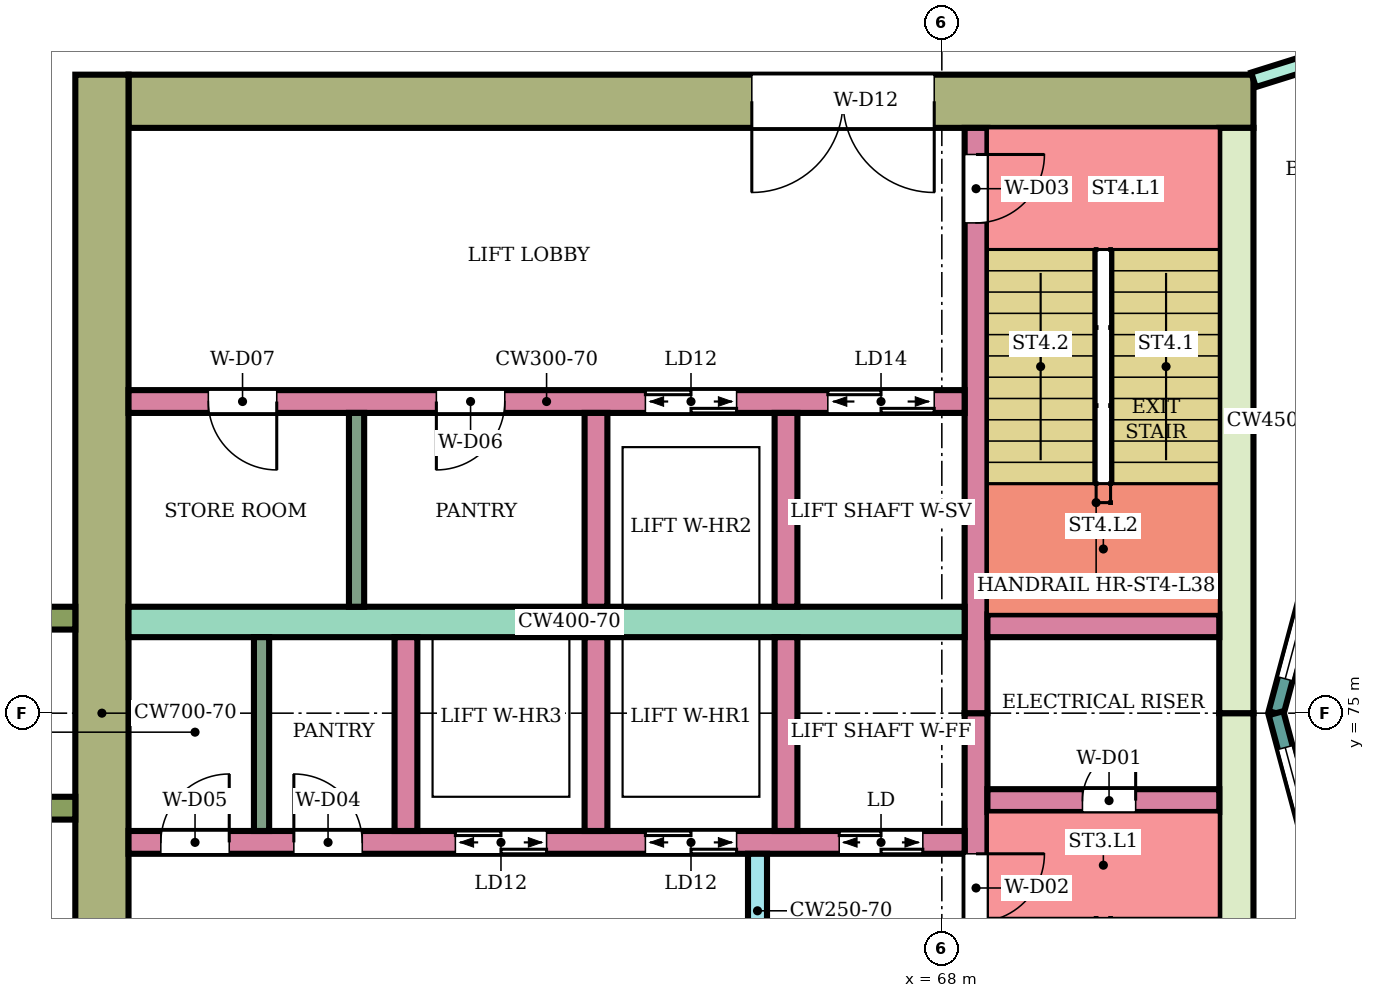
"""IFC4 building model, lengths in metres.
Left out: names, types, materials, properties, quantities, classifications, styles, units other than length and angle.
Written with IfcOpenShell. Run it as: python <this file> out.ifc"""

import sys

from ifc_helpers import new_model, si_unit, direction, frame, frame_2d, origin, place, context, subcontext, project, spatial, rectangle, extrude, element, fill, save


model = new_model("IFC4")
c1 = context("Model", 3, precision=1e-05, world=origin(), true_north=direction((0.0, 1.0)))
c2 = subcontext(c1, "Body", "Model", "MODEL_VIEW")
j1 = project(units=[si_unit("LENGTHUNIT", "METRE"), si_unit("PLANEANGLEUNIT", "RADIAN")], contexts=[c1])
p1 = place(None, origin())
s1 = spatial("IfcSite", under=j1, at=p1, CompositionType="ELEMENT")
p2 = place(p1, origin())
s2 = spatial("IfcBuilding", under=s1, at=p2, CompositionType="ELEMENT")
p3 = place(p2, frame((0.0, 0.0, 165.9)))
s3 = spatial("IfcBuildingStorey", under=s2, at=p3, CompositionType="ELEMENT", Elevation=165.9)
p4 = place(p3, frame((72.1, 83.05, 0.0), z_axis=(0.0, 0.0, 1.0), x_axis=(-1.0, 0.0, 0.0)))
e1 = element("IfcWall", 1, at=p4, inside=s3, PredefinedType="SHEAR", context=c2, shape_type="SweptSolid", body=[
    extrude(rectangle(XDim=14.8, YDim=0.7, at=frame_2d((7.4, 0.0))), origin(), (0.0, 0.0, 1.0), 3.78),
])
p5 = place(p4, frame((4.2, 0.0, 0.0)))
e2 = element("IfcOpeningElement", 2, at=p5, cuts=e1, PredefinedType="OPENING", context=c2, shape_type="SweptSolid", body=[
    extrude(rectangle(XDim=2.4, YDim=2.4, at=frame_2d((1.2, 1.2))), frame((0.0, 0.36, 0.0), z_axis=(0.0, -1.0, 0.0), x_axis=(1.0, 0.0, 0.0)), (0.0, 0.0, 1.0), 0.72),
])
for number, where, z_axis, x_axis in (
    (3, (71.875, 75.0, 0.0), (0.0, 0.0, 1.0), (0.0, -1.0, 0.0)),
    (4, (71.875, 82.7, 0.0), (0.0, 0.0, 1.0), (0.0, -1.0, 0.0)),
):
    element("IfcWall", number, at=place(p3, frame(where, z_axis=z_axis, x_axis=x_axis)), inside=s3, PredefinedType="SHEAR", context=c2, shape_type="SweptSolid", body=[
        extrude(rectangle(XDim=7.7, YDim=0.45, at=frame_2d((3.85, 0.0))), origin(), (0.0, 0.0, 1.0), 3.78),
    ])
p6 = place(p3, frame((56.95, 83.4, 0.0), z_axis=(0.0, 0.0, 1.0), x_axis=(0.0, -1.0, 0.0)))
e5 = element("IfcWall", 5, at=p6, inside=s3, PredefinedType="SHEAR", context=c2, shape_type="SweptSolid", body=[
    extrude(rectangle(XDim=16.8, YDim=0.7, at=frame_2d((8.4, 0.0))), origin(), (0.0, 0.0, 1.0), 3.78),
])
p7 = place(p3, frame((68.45, 75.0, 0.0), z_axis=(0.0, 0.0, 1.0), x_axis=(0.0, -1.0, 0.0)))
e6 = element("IfcWall", 6, at=p7, inside=s3, PredefinedType="SHEAR", context=c2, shape_type="SweptSolid", body=[
    extrude(rectangle(XDim=7.7, YDim=0.3, at=frame_2d((3.85, 0.0))), origin(), (0.0, 0.0, 1.0), 3.78),
])
p8 = place(p7, frame((1.85, 0.0, 0.0)))
e7 = element("IfcOpeningElement", 7, at=p8, cuts=e6, PredefinedType="OPENING", context=c2, shape_type="SweptSolid", body=[
    extrude(rectangle(XDim=0.9, YDim=2.1, at=frame_2d((0.45, 1.05))), frame((0.0, 0.16, 0.0), z_axis=(0.0, -1.0, 0.0), x_axis=(1.0, 0.0, 0.0)), (0.0, 0.0, 1.0), 0.32),
])
p9 = place(p3, frame((68.45, 82.7, 0.0), z_axis=(0.0, 0.0, 1.0), x_axis=(0.0, -1.0, 0.0)))
e8 = element("IfcWall", 8, at=p9, inside=s3, PredefinedType="SHEAR", context=c2, shape_type="SweptSolid", body=[
    extrude(rectangle(XDim=7.7, YDim=0.3, at=frame_2d((3.85, 0.0))), origin(), (0.0, 0.0, 1.0), 3.78),
])
p10 = place(p9, frame((0.35, 0.0, 0.0)))
e9 = element("IfcOpeningElement", 9, at=p10, cuts=e8, PredefinedType="OPENING", context=c2, shape_type="SweptSolid", body=[
    extrude(rectangle(XDim=0.9, YDim=2.1, at=frame_2d((0.45, 1.05))), frame((0.0, 0.16, 0.0), z_axis=(0.0, -1.0, 0.0), x_axis=(1.0, 0.0, 0.0)), (0.0, 0.0, 1.0), 0.32),
])
p11 = place(p3, frame((71.65, 73.85, 0.0), z_axis=(0.0, 0.0, 1.0), x_axis=(-1.0, 0.0, 0.0)))
e10 = element("IfcWall", 10, at=p11, inside=s3, PredefinedType="SHEAR", context=c2, shape_type="SweptSolid", body=[
    extrude(rectangle(XDim=3.05, YDim=0.3, at=frame_2d((1.525, 0.0))), origin(), (0.0, 0.0, 1.0), 3.78),
])
p12 = place(p11, frame((1.1, 0.0, 0.0)))
e11 = element("IfcOpeningElement", 11, at=p12, cuts=e10, PredefinedType="OPENING", context=c2, shape_type="SweptSolid", body=[
    extrude(rectangle(XDim=0.7, YDim=2.0, at=frame_2d((0.35, 1.0))), frame((0.0, 0.16, 0.0), z_axis=(0.0, -1.0, 0.0), x_axis=(1.0, 0.0, 0.0)), (0.0, 0.0, 1.0), 0.32),
])
p13 = place(p3, frame((71.65, 76.15, 0.0), z_axis=(0.0, 0.0, 1.0), x_axis=(-1.0, 0.0, 0.0)))
e12 = element("IfcWall", 12, at=p13, inside=s3, PredefinedType="SHEAR", context=c2, shape_type="SweptSolid", body=[
    extrude(rectangle(XDim=3.05, YDim=0.3, at=frame_2d((1.525, 0.0))), origin(), (0.0, 0.0, 1.0), 3.78),
])
p14 = place(p3, frame((68.3, 73.3, 0.0), z_axis=(0.0, 0.0, 1.0), x_axis=(-1.0, 0.0, 0.0)))
e13 = element("IfcWall", 13, at=p14, inside=s3, PredefinedType="SHEAR", context=c2, shape_type="SweptSolid", body=[
    extrude(rectangle(XDim=11.0, YDim=0.3, at=frame_2d((5.5, 0.0))), origin(), (0.0, 0.0, 1.0), 3.78),
])
p15 = place(p14, frame((0.55, 0.0, 0.0)))
e14 = element("IfcOpeningElement", 14, at=p15, cuts=e13, PredefinedType="OPENING", context=c2, shape_type="SweptSolid", body=[
    extrude(rectangle(XDim=1.1, YDim=2.1, at=frame_2d((0.55, 1.05))), frame((0.0, 0.16, 0.0), z_axis=(0.0, -1.0, 0.0), x_axis=(1.0, 0.0, 0.0)), (0.0, 0.0, 1.0), 0.32),
])
p16 = place(p14, frame((3.0, 0.0, 0.0)))
e15 = element("IfcOpeningElement", 15, at=p16, cuts=e13, PredefinedType="OPENING", context=c2, shape_type="SweptSolid", body=[
    extrude(rectangle(XDim=1.2, YDim=2.1, at=frame_2d((0.6, 1.05))), frame((0.0, 0.16, 0.0), z_axis=(0.0, -1.0, 0.0), x_axis=(1.0, 0.0, 0.0)), (0.0, 0.0, 1.0), 0.32),
])
p17 = place(p14, frame((5.5, 0.0, 0.0)))
e16 = element("IfcOpeningElement", 16, at=p17, cuts=e13, PredefinedType="OPENING", context=c2, shape_type="SweptSolid", body=[
    extrude(rectangle(XDim=1.2, YDim=2.1, at=frame_2d((0.6, 1.05))), frame((0.0, 0.16, 0.0), z_axis=(0.0, -1.0, 0.0), x_axis=(1.0, 0.0, 0.0)), (0.0, 0.0, 1.0), 0.32),
])
p18 = place(p14, frame((7.925, 0.0, 0.0)))
e17 = element("IfcOpeningElement", 17, at=p18, cuts=e13, PredefinedType="OPENING", context=c2, shape_type="SweptSolid", body=[
    extrude(rectangle(XDim=0.9, YDim=2.1, at=frame_2d((0.45, 1.05))), frame((0.0, 0.16, 0.0), z_axis=(0.0, -1.0, 0.0), x_axis=(1.0, 0.0, 0.0)), (0.0, 0.0, 1.0), 0.32),
])
p19 = place(p14, frame((9.675, 0.0, 0.0)))
e18 = element("IfcOpeningElement", 18, at=p19, cuts=e13, PredefinedType="OPENING", context=c2, shape_type="SweptSolid", body=[
    extrude(rectangle(XDim=0.9, YDim=2.1, at=frame_2d((0.45, 1.05))), frame((0.0, 0.16, 0.0), z_axis=(0.0, -1.0, 0.0), x_axis=(1.0, 0.0, 0.0)), (0.0, 0.0, 1.0), 0.32),
])
p20 = place(p3, frame((68.3, 76.2, 0.0), z_axis=(0.0, 0.0, 1.0), x_axis=(-1.0, 0.0, 0.0)))
e19 = element("IfcWall", 19, at=p20, inside=s3, PredefinedType="SHEAR", context=c2, shape_type="SweptSolid", body=[
    extrude(rectangle(XDim=11.0, YDim=0.4, at=frame_2d((5.5, 0.0))), origin(), (0.0, 0.0, 1.0), 3.78),
])
p21 = place(p3, frame((68.3, 79.1, 0.0), z_axis=(0.0, 0.0, 1.0), x_axis=(-1.0, 0.0, 0.0)))
e20 = element("IfcWall", 20, at=p21, inside=s3, PredefinedType="SHEAR", context=c2, shape_type="SweptSolid", body=[
    extrude(rectangle(XDim=11.0, YDim=0.3, at=frame_2d((5.5, 0.0))), origin(), (0.0, 0.0, 1.0), 3.78),
])
p22 = place(p21, frame((0.4, 0.0, 0.0)))
e21 = element("IfcOpeningElement", 21, at=p22, cuts=e20, PredefinedType="OPENING", context=c2, shape_type="SweptSolid", body=[
    extrude(rectangle(XDim=1.4, YDim=2.1, at=frame_2d((0.7, 1.05))), frame((0.0, 0.16, 0.0), z_axis=(0.0, -1.0, 0.0), x_axis=(1.0, 0.0, 0.0)), (0.0, 0.0, 1.0), 0.32),
])
p23 = place(p21, frame((3.0, 0.0, 0.0)))
e22 = element("IfcOpeningElement", 22, at=p23, cuts=e20, PredefinedType="OPENING", context=c2, shape_type="SweptSolid", body=[
    extrude(rectangle(XDim=1.2, YDim=2.1, at=frame_2d((0.6, 1.05))), frame((0.0, 0.16, 0.0), z_axis=(0.0, -1.0, 0.0), x_axis=(1.0, 0.0, 0.0)), (0.0, 0.0, 1.0), 0.32),
])
p24 = place(p21, frame((6.05, 0.0, 0.0)))
e23 = element("IfcOpeningElement", 23, at=p24, cuts=e20, PredefinedType="OPENING", context=c2, shape_type="SweptSolid", body=[
    extrude(rectangle(XDim=0.9, YDim=2.1, at=frame_2d((0.45, 1.05))), frame((0.0, 0.16, 0.0), z_axis=(0.0, -1.0, 0.0), x_axis=(1.0, 0.0, 0.0)), (0.0, 0.0, 1.0), 0.32),
])
p25 = place(p21, frame((9.05, 0.0, 0.0)))
e24 = element("IfcOpeningElement", 24, at=p25, cuts=e20, PredefinedType="OPENING", context=c2, shape_type="SweptSolid", body=[
    extrude(rectangle(XDim=0.9, YDim=2.1, at=frame_2d((0.45, 1.05))), frame((0.0, 0.16, 0.0), z_axis=(0.0, -1.0, 0.0), x_axis=(1.0, 0.0, 0.0)), (0.0, 0.0, 1.0), 0.32),
])
for number, where, z_axis, x_axis in (
    (25, (65.95, 76.0, 0.0), (0.0, 0.0, 1.0), (0.0, -1.0, 0.0)),
    (26, (63.45, 76.0, 0.0), (0.0, 0.0, 1.0), (0.0, -1.0, 0.0)),
    (27, (60.95, 76.0, 0.0), (0.0, 0.0, 1.0), (0.0, -1.0, 0.0)),
    (28, (65.95, 78.95, 0.0), (0.0, 0.0, 1.0), (0.0, -1.0, 0.0)),
    (29, (63.45, 78.95, 0.0), (0.0, 0.0, 1.0), (0.0, -1.0, 0.0)),
):
    element("IfcWall", number, at=place(p3, frame(where, z_axis=z_axis, x_axis=x_axis)), inside=s3, PredefinedType="SHEAR", context=c2, shape_type="SweptSolid", body=[
        extrude(rectangle(XDim=2.55, YDim=0.3, at=frame_2d((1.275, 0.0))), origin(), (0.0, 0.0, 1.0), 3.78),
    ])
p26 = place(p3, frame((65.575, 73.15, 0.0), z_axis=(0.0, 0.0, 1.0), x_axis=(0.0, -1.0, 0.0)))
e30 = element("IfcWall", 30, at=p26, inside=s3, PredefinedType="SHEAR", context=c2, shape_type="SweptSolid", body=[
    extrude(rectangle(XDim=1.5, YDim=0.25, at=frame_2d((0.75, 0.0))), origin(), (0.0, 0.0, 1.0), 3.78),
])
for number, where, z_axis, x_axis in (
    (31, (56.6, 76.25, 0.0), (0.0, 0.0, 1.0), (-1.0, 0.0, 0.0)),
    (32, (56.6, 73.75, 0.0), (0.0, 0.0, 1.0), (-1.0, 0.0, 0.0)),
):
    element("IfcWall", number, at=place(p3, frame(where, z_axis=z_axis, x_axis=x_axis)), inside=s3, PredefinedType="NOTDEFINED", context=c2, shape_type="SweptSolid", body=[
        extrude(rectangle(XDim=2.416, YDim=0.3, at=frame_2d((1.208, 0.0))), origin(), (0.0, 0.0, 1.0), 4.1),
    ])
p27 = place(p3, frame((73.415, 78.802, 0.0), z_axis=(0.0, 0.0, 1.0), x_axis=(-0.258789828301, -0.965933654434, 0.0)))
e33 = element("IfcWall", 33, at=p27, inside=s3, PredefinedType="NOTDEFINED", context=c2, shape_type="SweptSolid", body=[
    extrude(rectangle(XDim=3.936, YDim=0.2, at=frame_2d((1.968, 0.0))), origin(), (0.0, 0.0, 1.0), 4.1),
])
p28 = place(p27, frame((0.468, 0.0, 0.9)))
e34 = element("IfcOpeningElement", 34, at=p28, cuts=e33, PredefinedType="OPENING", context=c2, shape_type="SweptSolid", body=[
    extrude(rectangle(XDim=3.0, YDim=2.3, at=frame_2d((1.5, 1.15))), frame((0.0, 0.11, 0.0), z_axis=(0.0, -1.0, 0.0), x_axis=(1.0, 0.0, 0.0)), (0.0, 0.0, 1.0), 0.22),
])
p29 = place(p3, frame((72.396, 75.0, 0.0), z_axis=(0.0, 0.0, 1.0), x_axis=(0.258789828301, -0.965933654434, 0.0)))
e35 = element("IfcWall", 35, at=p29, inside=s3, PredefinedType="NOTDEFINED", context=c2, shape_type="SweptSolid", body=[
    extrude(rectangle(XDim=3.936, YDim=0.2, at=frame_2d((1.968, 0.0))), origin(), (0.0, 0.0, 1.0), 4.1),
])
p30 = place(p29, frame((0.468, 0.0, 0.9)))
e36 = element("IfcOpeningElement", 36, at=p30, cuts=e35, PredefinedType="OPENING", context=c2, shape_type="SweptSolid", body=[
    extrude(rectangle(XDim=3.0, YDim=2.3, at=frame_2d((1.5, 1.15))), frame((0.0, 0.11, 0.0), z_axis=(0.0, -1.0, 0.0), x_axis=(1.0, 0.0, 0.0)), (0.0, 0.0, 1.0), 0.22),
])
p31 = place(p3, frame((72.1, 83.332, 0.0), z_axis=(0.0, 0.0, 1.0), x_axis=(0.954233106619, 0.299063836383, 0.0)))
e37 = element("IfcWall", 37, at=p31, inside=s3, PredefinedType="PARTITIONING", context=c2, shape_type="SweptSolid", body=[
    extrude(rectangle(XDim=2.414, YDim=0.2, at=frame_2d((1.207, 0.0))), origin(), (0.0, 0.0, 1.0), 3.65),
])
p32 = place(p31, frame((0.762, 0.0, 0.0)))
e38 = element("IfcOpeningElement", 38, at=p32, cuts=e37, PredefinedType="OPENING", context=c2, shape_type="SweptSolid", body=[
    extrude(rectangle(XDim=0.9, YDim=2.1, at=frame_2d((0.45, 1.05))), frame((0.0, 0.11, 0.0), z_axis=(0.0, -1.0, 0.0), x_axis=(1.0, 0.0, 0.0)), (0.0, 0.0, 1.0), 0.22),
])
for number, where, z_axis, x_axis in (
    (39, (59.05, 76.0, 0.0), (0.0, 0.0, 1.0), (0.0, -1.0, 0.0)),
    (40, (60.3, 78.95, 0.0), (0.0, 0.0, 1.0), (0.0, -1.0, 0.0)),
):
    element("IfcWall", number, at=place(p3, frame(where, z_axis=z_axis, x_axis=x_axis)), inside=s3, PredefinedType="PARTITIONING", context=c2, shape_type="SweptSolid", body=[
        extrude(rectangle(XDim=2.55, YDim=0.2, at=frame_2d((1.275, 0.0))), origin(), (0.0, 0.0, 1.0), 3.78),
    ])
p33 = place(p28, origin())
e41 = element("IfcWindow", 41, at=p33, inside=s3, PartitioningType="SINGLE_PANEL", PredefinedType="WINDOW", context=c2, shape_type="SweptSolid", body=[
    extrude(rectangle(XDim=3.0, YDim=2.3, at=frame_2d((1.5, 1.15))), frame((0.0, 0.03, 0.0), z_axis=(0.0, -1.0, 0.0), x_axis=(1.0, 0.0, 0.0)), (0.0, 0.0, 1.0), 0.06),
])
fill(e34, e41)
p34 = place(p30, origin())
e42 = element("IfcWindow", 42, at=p34, inside=s3, PartitioningType="SINGLE_PANEL", PredefinedType="WINDOW", context=c2, shape_type="SweptSolid", body=[
    extrude(rectangle(XDim=3.0, YDim=2.3, at=frame_2d((1.5, 1.15))), frame((0.0, 0.03, 0.0), z_axis=(0.0, -1.0, 0.0), x_axis=(1.0, 0.0, 0.0)), (0.0, 0.0, 1.0), 0.06),
])
fill(e36, e42)
p35 = place(p12, frame((0.7, 0.0, 0.0), z_axis=(0.0, 0.0, 1.0), x_axis=(-1.0, 0.0, 0.0)))
e43 = element("IfcDoor", 43, at=p35, inside=s3, OperationType="SINGLE_SWING_RIGHT", PredefinedType="DOOR", context=c2, shape_type="SweptSolid", body=[
    extrude(rectangle(XDim=0.7, YDim=2.0, at=frame_2d((0.35, 1.0))), frame((0.0, 0.025, 0.0), z_axis=(0.0, -1.0, 0.0), x_axis=(1.0, 0.0, 0.0)), (0.0, 0.0, 1.0), 0.05),
])
fill(e11, e43)
p36 = place(p8, origin())
e44 = element("IfcDoor", 44, at=p36, inside=s3, OperationType="SINGLE_SWING_LEFT", PredefinedType="DOOR", context=c2, shape_type="SweptSolid", body=[
    extrude(rectangle(XDim=0.9, YDim=2.1, at=frame_2d((0.45, 1.05))), frame((0.0, 0.025, 0.0), z_axis=(0.0, -1.0, 0.0), x_axis=(1.0, 0.0, 0.0)), (0.0, 0.0, 1.0), 0.05),
])
fill(e7, e44)
p37 = place(p10, origin())
e45 = element("IfcDoor", 45, at=p37, inside=s3, OperationType="SINGLE_SWING_LEFT", PredefinedType="DOOR", context=c2, shape_type="SweptSolid", body=[
    extrude(rectangle(XDim=0.9, YDim=2.1, at=frame_2d((0.45, 1.05))), frame((0.0, 0.025, 0.0), z_axis=(0.0, -1.0, 0.0), x_axis=(1.0, 0.0, 0.0)), (0.0, 0.0, 1.0), 0.05),
])
fill(e9, e45)
p38 = place(p15, origin())
e46 = element("IfcDoor", 46, at=p38, inside=s3, OperationType="DOUBLE_DOOR_SLIDING", PredefinedType="DOOR", context=c2, shape_type="SweptSolid", body=[
    extrude(rectangle(XDim=1.1, YDim=2.1, at=frame_2d((0.55, 1.05))), frame((0.0, 0.025, 0.0), z_axis=(0.0, -1.0, 0.0), x_axis=(1.0, 0.0, 0.0)), (0.0, 0.0, 1.0), 0.05),
])
fill(e14, e46)
p39 = place(p16, origin())
e47 = element("IfcDoor", 47, at=p39, inside=s3, OperationType="DOUBLE_DOOR_SLIDING", PredefinedType="DOOR", context=c2, shape_type="SweptSolid", body=[
    extrude(rectangle(XDim=1.2, YDim=2.1, at=frame_2d((0.6, 1.05))), frame((0.0, 0.025, 0.0), z_axis=(0.0, -1.0, 0.0), x_axis=(1.0, 0.0, 0.0)), (0.0, 0.0, 1.0), 0.05),
])
fill(e15, e47)
p40 = place(p17, origin())
e48 = element("IfcDoor", 48, at=p40, inside=s3, OperationType="DOUBLE_DOOR_SLIDING", PredefinedType="DOOR", context=c2, shape_type="SweptSolid", body=[
    extrude(rectangle(XDim=1.2, YDim=2.1, at=frame_2d((0.6, 1.05))), frame((0.0, 0.025, 0.0), z_axis=(0.0, -1.0, 0.0), x_axis=(1.0, 0.0, 0.0)), (0.0, 0.0, 1.0), 0.05),
])
fill(e16, e48)
p41 = place(p18, frame((0.9, 0.0, 0.0), z_axis=(0.0, 0.0, 1.0), x_axis=(-1.0, 0.0, 0.0)))
e49 = element("IfcDoor", 49, at=p41, inside=s3, OperationType="SINGLE_SWING_LEFT", PredefinedType="DOOR", context=c2, shape_type="SweptSolid", body=[
    extrude(rectangle(XDim=0.9, YDim=2.1, at=frame_2d((0.45, 1.05))), frame((0.0, 0.025, 0.0), z_axis=(0.0, -1.0, 0.0), x_axis=(1.0, 0.0, 0.0)), (0.0, 0.0, 1.0), 0.05),
])
fill(e17, e49)
p42 = place(p19, frame((0.9, 0.0, 0.0), z_axis=(0.0, 0.0, 1.0), x_axis=(-1.0, 0.0, 0.0)))
e50 = element("IfcDoor", 50, at=p42, inside=s3, OperationType="SINGLE_SWING_RIGHT", PredefinedType="DOOR", context=c2, shape_type="SweptSolid", body=[
    extrude(rectangle(XDim=0.9, YDim=2.1, at=frame_2d((0.45, 1.05))), frame((0.0, 0.025, 0.0), z_axis=(0.0, -1.0, 0.0), x_axis=(1.0, 0.0, 0.0)), (0.0, 0.0, 1.0), 0.05),
])
fill(e18, e50)
p43 = place(p22, origin())
e51 = element("IfcDoor", 51, at=p43, inside=s3, OperationType="DOUBLE_DOOR_SLIDING", PredefinedType="DOOR", context=c2, shape_type="SweptSolid", body=[
    extrude(rectangle(XDim=1.4, YDim=2.1, at=frame_2d((0.7, 1.05))), frame((0.0, 0.025, 0.0), z_axis=(0.0, -1.0, 0.0), x_axis=(1.0, 0.0, 0.0)), (0.0, 0.0, 1.0), 0.05),
])
fill(e21, e51)
p44 = place(p23, origin())
e52 = element("IfcDoor", 52, at=p44, inside=s3, OperationType="DOUBLE_DOOR_SLIDING", PredefinedType="DOOR", context=c2, shape_type="SweptSolid", body=[
    extrude(rectangle(XDim=1.2, YDim=2.1, at=frame_2d((0.6, 1.05))), frame((0.0, 0.025, 0.0), z_axis=(0.0, -1.0, 0.0), x_axis=(1.0, 0.0, 0.0)), (0.0, 0.0, 1.0), 0.05),
])
fill(e22, e52)
p45 = place(p24, origin())
e53 = element("IfcDoor", 53, at=p45, inside=s3, OperationType="SINGLE_SWING_RIGHT", PredefinedType="DOOR", context=c2, shape_type="SweptSolid", body=[
    extrude(rectangle(XDim=0.9, YDim=2.1, at=frame_2d((0.45, 1.05))), frame((0.0, 0.025, 0.0), z_axis=(0.0, -1.0, 0.0), x_axis=(1.0, 0.0, 0.0)), (0.0, 0.0, 1.0), 0.05),
])
fill(e23, e53)
p46 = place(p25, origin())
e54 = element("IfcDoor", 54, at=p46, inside=s3, OperationType="SINGLE_SWING_LEFT", PredefinedType="DOOR", context=c2, shape_type="SweptSolid", body=[
    extrude(rectangle(XDim=0.9, YDim=2.1, at=frame_2d((0.45, 1.05))), frame((0.0, 0.025, 0.0), z_axis=(0.0, -1.0, 0.0), x_axis=(1.0, 0.0, 0.0)), (0.0, 0.0, 1.0), 0.05),
])
fill(e24, e54)
p47 = place(p5, origin())
e55 = element("IfcDoor", 55, at=p47, inside=s3, OperationType="DOUBLE_DOOR_SINGLE_SWING", PredefinedType="DOOR", context=c2, shape_type="SweptSolid", body=[
    extrude(rectangle(XDim=2.4, YDim=2.4, at=frame_2d((1.2, 1.2))), frame((0.0, 0.025, 0.0), z_axis=(0.0, -1.0, 0.0), x_axis=(1.0, 0.0, 0.0)), (0.0, 0.0, 1.0), 0.05),
])
fill(e2, e55)
save(model, sys.argv[1])
